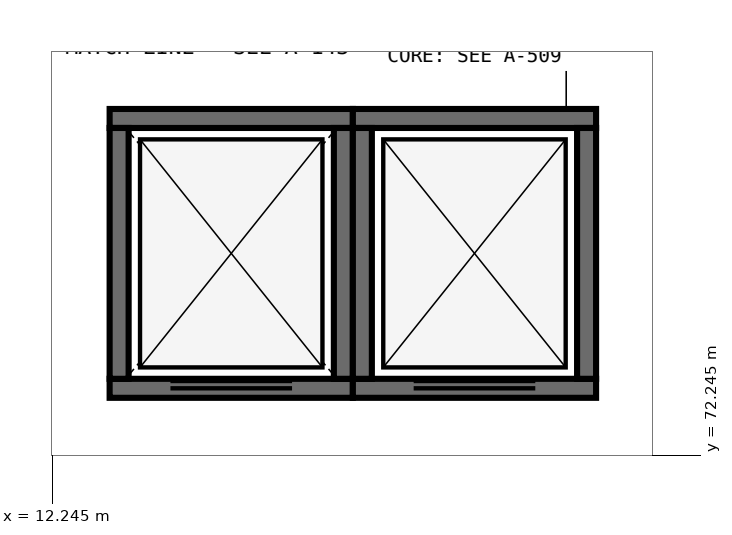
"""IFC4 building model, lengths in metres.
Left out: names, types, materials, properties, quantities, classifications, styles, units other than length and angle.
Written with IfcOpenShell. Run it as: python <this file> out.ifc"""

import sys

from ifc_helpers import new_model, si_unit, direction, frame, frame_2d, origin, place, context, subcontext, project, spatial, rectangle, extrude, element, fill, save


model = new_model("IFC4")
c1 = context("Model", 3, precision=1e-05, world=origin(), true_north=direction((0.0, 1.0)))
c2 = subcontext(c1, "Body", "Model", "MODEL_VIEW")
j1 = project(units=[si_unit("LENGTHUNIT", "METRE"), si_unit("PLANEANGLEUNIT", "RADIAN")], contexts=[c1])
p1 = place(None, origin())
s1 = spatial("IfcSite", under=j1, at=p1, CompositionType="ELEMENT")
p2 = place(p1, origin())
s2 = spatial("IfcBuilding", under=s1, at=p2, CompositionType="ELEMENT")
p3 = place(p2, frame((0.0, 0.0, 18.0)))
s3 = spatial("IfcBuildingStorey", under=s2, at=p3, CompositionType="ELEMENT", Elevation=18.0)
p4 = place(p3, frame((13.0, 73.125, 0.0), z_axis=(0.0, 0.0, 1.0), x_axis=(1.0, 0.0, 0.0)))
e1 = element("IfcWall", 1, at=p4, inside=s3, PredefinedType="SHEAR", context=c2, shape_type="SweptSolid", body=[
    extrude(rectangle(XDim=3.2, YDim=0.25, at=frame_2d((1.6, 0.0))), origin(), (0.0, 0.0, 1.0), 5.4),
])
p5 = place(p4, frame((0.8, 0.0, 0.0)))
e2 = element("IfcOpeningElement", 2, at=p5, cuts=e1, PredefinedType="OPENING", context=c2, shape_type="SweptSolid", body=[
    extrude(rectangle(XDim=1.6, YDim=2.4, at=frame_2d((0.8, 1.2))), frame((0.0, 0.14, 0.0), z_axis=(0.0, -1.0, 0.0), x_axis=(1.0, 0.0, 0.0)), (0.0, 0.0, 1.0), 0.28),
])
p6 = place(p3, frame((16.2, 76.675, 0.0), z_axis=(0.0, 0.0, 1.0), x_axis=(-1.0, 0.0, 0.0)))
e3 = element("IfcWall", 3, at=p6, inside=s3, PredefinedType="SHEAR", context=c2, shape_type="SweptSolid", body=[
    extrude(rectangle(XDim=3.2, YDim=0.25, at=frame_2d((1.6, 0.0))), origin(), (0.0, 0.0, 1.0), 5.4),
])
for number, where, z_axis, x_axis in (
    (4, (13.125, 76.55, 0.0), (0.0, 0.0, 1.0), (0.0, -1.0, 0.0)),
    (5, (16.075, 73.25, 0.0), (0.0, 0.0, 1.0), (0.0, 1.0, 0.0)),
):
    element("IfcWall", number, at=place(p3, frame(where, z_axis=z_axis, x_axis=x_axis)), inside=s3, PredefinedType="SHEAR", context=c2, shape_type="SweptSolid", body=[
        extrude(rectangle(XDim=3.3, YDim=0.25, at=frame_2d((1.65, 0.0))), origin(), (0.0, 0.0, 1.0), 5.4),
    ])
p7 = place(p3, frame((16.2, 73.125, 0.0), z_axis=(0.0, 0.0, 1.0), x_axis=(1.0, 0.0, 0.0)))
e6 = element("IfcWall", 6, at=p7, inside=s3, PredefinedType="SHEAR", context=c2, shape_type="SweptSolid", body=[
    extrude(rectangle(XDim=3.2, YDim=0.25, at=frame_2d((1.6, 0.0))), origin(), (0.0, 0.0, 1.0), 5.4),
])
p8 = place(p7, frame((0.8, 0.0, 0.0)))
e7 = element("IfcOpeningElement", 7, at=p8, cuts=e6, PredefinedType="OPENING", context=c2, shape_type="SweptSolid", body=[
    extrude(rectangle(XDim=1.6, YDim=2.4, at=frame_2d((0.8, 1.2))), frame((0.0, 0.14, 0.0), z_axis=(0.0, -1.0, 0.0), x_axis=(1.0, 0.0, 0.0)), (0.0, 0.0, 1.0), 0.28),
])
p9 = place(p3, frame((19.4, 76.675, 0.0), z_axis=(0.0, 0.0, 1.0), x_axis=(-1.0, 0.0, 0.0)))
e8 = element("IfcWall", 8, at=p9, inside=s3, PredefinedType="SHEAR", context=c2, shape_type="SweptSolid", body=[
    extrude(rectangle(XDim=3.2, YDim=0.25, at=frame_2d((1.6, 0.0))), origin(), (0.0, 0.0, 1.0), 5.4),
])
for number, where, z_axis, x_axis in (
    (9, (16.325, 76.55, 0.0), (0.0, 0.0, 1.0), (0.0, -1.0, 0.0)),
    (10, (19.275, 73.25, 0.0), (0.0, 0.0, 1.0), (0.0, 1.0, 0.0)),
):
    element("IfcWall", number, at=place(p3, frame(where, z_axis=z_axis, x_axis=x_axis)), inside=s3, PredefinedType="SHEAR", context=c2, shape_type="SweptSolid", body=[
        extrude(rectangle(XDim=3.3, YDim=0.25, at=frame_2d((1.65, 0.0))), origin(), (0.0, 0.0, 1.0), 5.4),
    ])
p10 = place(p5, origin())
e11 = element("IfcDoor", 11, at=p10, inside=s3, OperationType="DOUBLE_DOOR_SLIDING", PredefinedType="DOOR", context=c2, shape_type="SweptSolid", body=[
    extrude(rectangle(XDim=1.6, YDim=2.4, at=frame_2d((0.8, 1.2))), frame((0.0, 0.025, 0.0), z_axis=(0.0, -1.0, 0.0), x_axis=(1.0, 0.0, 0.0)), (0.0, 0.0, 1.0), 0.05),
])
fill(e2, e11)
p11 = place(p8, origin())
e12 = element("IfcDoor", 12, at=p11, inside=s3, OperationType="DOUBLE_DOOR_SLIDING", PredefinedType="DOOR", context=c2, shape_type="SweptSolid", body=[
    extrude(rectangle(XDim=1.6, YDim=2.4, at=frame_2d((0.8, 1.2))), frame((0.0, 0.025, 0.0), z_axis=(0.0, -1.0, 0.0), x_axis=(1.0, 0.0, 0.0)), (0.0, 0.0, 1.0), 0.05),
])
fill(e7, e12)
save(model, sys.argv[1])
